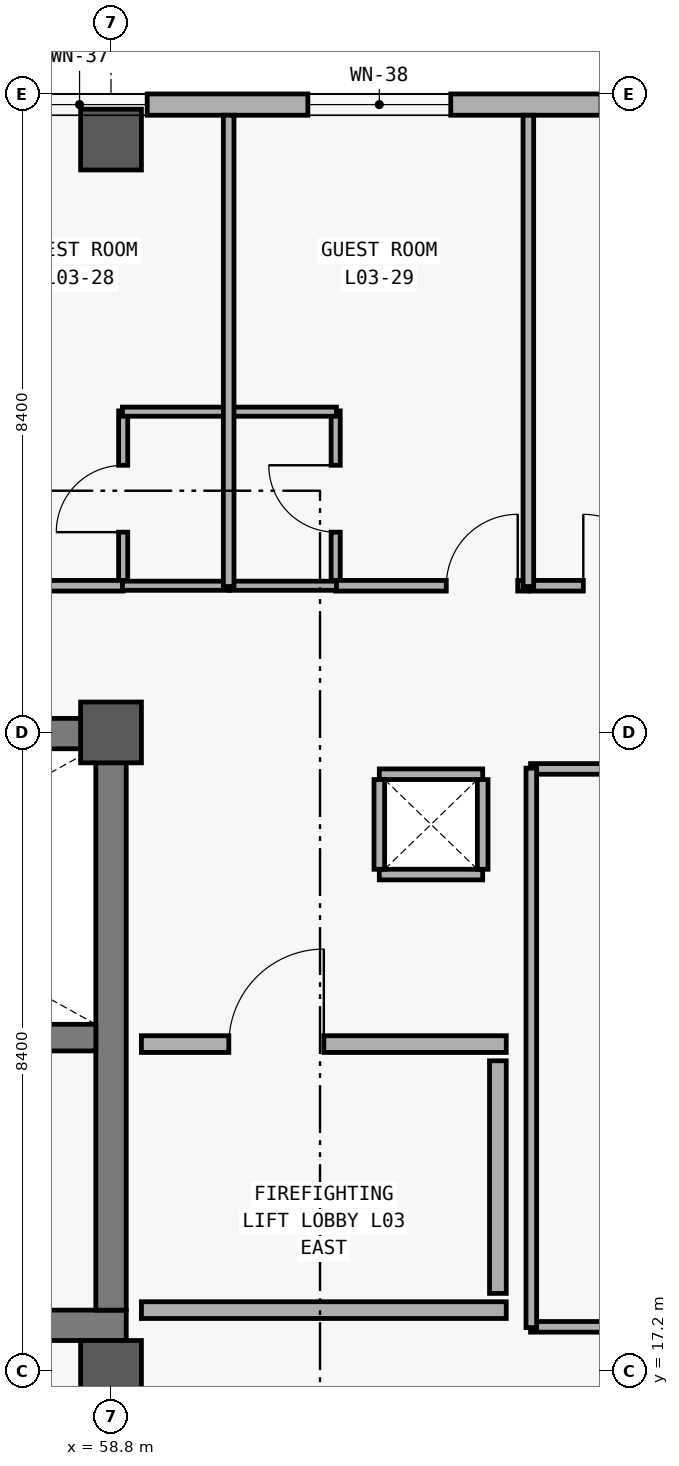
"""IFC4 building model, lengths in metres.
Left out: names, types, materials, properties, quantities, classifications, styles, units other than length and angle.
Written with IfcOpenShell. Run it as: python <this file> out.ifc"""

import sys

from ifc_helpers import new_model, si_unit, direction, frame, frame_2d, origin, origin_2d, place, context, subcontext, project, spatial, rectangle, extrude, element, fill, save


model = new_model("IFC4")
c1 = context("Model", 3, precision=1e-05, world=origin(), true_north=direction((0.0, 1.0)))
c2 = subcontext(c1, "Body", "Model", "MODEL_VIEW")
j1 = project(units=[si_unit("LENGTHUNIT", "METRE"), si_unit("PLANEANGLEUNIT", "RADIAN")], contexts=[c1])
p1 = place(None, origin())
s1 = spatial("IfcSite", under=j1, at=p1, CompositionType="ELEMENT")
p2 = place(p1, origin())
s2 = spatial("IfcBuilding", under=s1, at=p2, CompositionType="ELEMENT")
p3 = place(p2, frame((0.0, 0.0, 15.0)))
s3 = spatial("IfcBuildingStorey", under=s2, at=p3, CompositionType="ELEMENT", Elevation=15.0)
for number, where, z_axis, x_axis in (
    (1, (58.8, 17.2, 0.0), (0.0, 0.0, 1.0), (1.0, 0.0, 0.0)),
    (2, (58.8, 25.6, 0.0), (0.0, 0.0, 1.0), (1.0, 0.0, 0.0)),
    (3, (58.8, 33.4, 0.0), (0.0, 0.0, 1.0), (1.0, 0.0, 0.0)),
):
    element("IfcColumn", number, at=place(p3, frame(where, z_axis=z_axis, x_axis=x_axis)), inside=s3, PredefinedType="COLUMN", context=c2, shape_type="SweptSolid", body=[
        extrude(rectangle(XDim=0.8, YDim=0.8, at=origin_2d()), origin(), (0.0, 0.0, 1.0), 4.2),
    ])
p4 = place(p3, frame((8.68, 33.86, 0.0), z_axis=(0.0, 0.0, 1.0), x_axis=(1.0, 0.0, 0.0)))
e4 = element("IfcWall", 4, at=p4, inside=s3, PredefinedType="SOLIDWALL", context=c2, shape_type="SweptSolid", body=[
    extrude(rectangle(XDim=83.44, YDim=0.28, at=frame_2d((41.72, 0.0))), origin(), (0.0, 0.0, 1.0), 3.92),
])
p5 = place(p4, frame((4.895, 0.0, 0.85)))
e5 = element("IfcOpeningElement", 5, at=p5, cuts=e4, PredefinedType="OPENING", context=c2, shape_type="SweptSolid", body=[
    extrude(rectangle(XDim=2.6, YDim=2.2, at=frame_2d((1.3, 1.1))), frame((0.0, 0.15, 0.0), z_axis=(0.0, -1.0, 0.0), x_axis=(1.0, 0.0, 0.0)), (0.0, 0.0, 1.0), 0.3),
])
p6 = place(p4, frame((13.371, 0.0, 0.85)))
e6 = element("IfcOpeningElement", 6, at=p6, cuts=e4, PredefinedType="OPENING", context=c2, shape_type="SweptSolid", body=[
    extrude(rectangle(XDim=1.7, YDim=2.0, at=frame_2d((0.85, 1.0))), frame((0.0, 0.15, 0.0), z_axis=(0.0, -1.0, 0.0), x_axis=(1.0, 0.0, 0.0)), (0.0, 0.0, 1.0), 0.3),
])
p7 = place(p4, frame((17.015, 0.0, 0.85)))
e7 = element("IfcOpeningElement", 7, at=p7, cuts=e4, PredefinedType="OPENING", context=c2, shape_type="SweptSolid", body=[
    extrude(rectangle(XDim=2.3, YDim=2.05, at=frame_2d((1.15, 1.025))), frame((0.0, 0.15, 0.0), z_axis=(0.0, -1.0, 0.0), x_axis=(1.0, 0.0, 0.0)), (0.0, 0.0, 1.0), 0.3),
])
p8 = place(p4, frame((20.732, 0.0, 0.85)))
e8 = element("IfcOpeningElement", 8, at=p8, cuts=e4, PredefinedType="OPENING", context=c2, shape_type="SweptSolid", body=[
    extrude(rectangle(XDim=2.75, YDim=2.1, at=frame_2d((1.375, 1.05))), frame((0.0, 0.15, 0.0), z_axis=(0.0, -1.0, 0.0), x_axis=(1.0, 0.0, 0.0)), (0.0, 0.0, 1.0), 0.3),
])
p9 = place(p4, frame((25.46, 0.0, 0.85)))
e9 = element("IfcOpeningElement", 9, at=p9, cuts=e4, PredefinedType="OPENING", context=c2, shape_type="SweptSolid", body=[
    extrude(rectangle(XDim=1.18, YDim=1.5, at=frame_2d((0.59, 0.75))), frame((0.0, 0.15, 0.0), z_axis=(0.0, -1.0, 0.0), x_axis=(1.0, 0.0, 0.0)), (0.0, 0.0, 1.0), 0.3),
])
p10 = place(p4, frame((29.352, 0.0, 0.85)))
e10 = element("IfcOpeningElement", 10, at=p10, cuts=e4, PredefinedType="OPENING", context=c2, shape_type="SweptSolid", body=[
    extrude(rectangle(XDim=1.28, YDim=1.6, at=frame_2d((0.64, 0.8))), frame((0.0, 0.15, 0.0), z_axis=(0.0, -1.0, 0.0), x_axis=(1.0, 0.0, 0.0)), (0.0, 0.0, 1.0), 0.3),
])
p11 = place(p4, frame((33.245, 0.0, 0.85)))
e11 = element("IfcOpeningElement", 11, at=p11, cuts=e4, PredefinedType="OPENING", context=c2, shape_type="SweptSolid", body=[
    extrude(rectangle(XDim=1.38, YDim=1.7, at=frame_2d((0.69, 0.85))), frame((0.0, 0.15, 0.0), z_axis=(0.0, -1.0, 0.0), x_axis=(1.0, 0.0, 0.0)), (0.0, 0.0, 1.0), 0.3),
])
p12 = place(p4, frame((37.138, 0.0, 0.85)))
e12 = element("IfcOpeningElement", 12, at=p12, cuts=e4, PredefinedType="OPENING", context=c2, shape_type="SweptSolid", body=[
    extrude(rectangle(XDim=1.48, YDim=1.8, at=frame_2d((0.74, 0.9))), frame((0.0, 0.15, 0.0), z_axis=(0.0, -1.0, 0.0), x_axis=(1.0, 0.0, 0.0)), (0.0, 0.0, 1.0), 0.3),
])
p13 = place(p4, frame((41.031, 0.0, 0.85)))
e13 = element("IfcOpeningElement", 13, at=p13, cuts=e4, PredefinedType="OPENING", context=c2, shape_type="SweptSolid", body=[
    extrude(rectangle(XDim=1.58, YDim=1.85, at=frame_2d((0.79, 0.925))), frame((0.0, 0.15, 0.0), z_axis=(0.0, -1.0, 0.0), x_axis=(1.0, 0.0, 0.0)), (0.0, 0.0, 1.0), 0.3),
])
p14 = place(p4, frame((44.923, 0.0, 0.85)))
e14 = element("IfcOpeningElement", 14, at=p14, cuts=e4, PredefinedType="OPENING", context=c2, shape_type="SweptSolid", body=[
    extrude(rectangle(XDim=1.68, YDim=1.9, at=frame_2d((0.84, 0.95))), frame((0.0, 0.15, 0.0), z_axis=(0.0, -1.0, 0.0), x_axis=(1.0, 0.0, 0.0)), (0.0, 0.0, 1.0), 0.3),
])
p15 = place(p4, frame((48.816, 0.0, 0.85)))
e15 = element("IfcOpeningElement", 15, at=p15, cuts=e4, PredefinedType="OPENING", context=c2, shape_type="SweptSolid", body=[
    extrude(rectangle(XDim=1.78, YDim=1.95, at=frame_2d((0.89, 0.975))), frame((0.0, 0.15, 0.0), z_axis=(0.0, -1.0, 0.0), x_axis=(1.0, 0.0, 0.0)), (0.0, 0.0, 1.0), 0.3),
])
p16 = place(p4, frame((52.71, 0.0, 0.85)))
e16 = element("IfcOpeningElement", 16, at=p16, cuts=e4, PredefinedType="OPENING", context=c2, shape_type="SweptSolid", body=[
    extrude(rectangle(XDim=1.88, YDim=1.95, at=frame_2d((0.94, 0.975))), frame((0.0, 0.15, 0.0), z_axis=(0.0, -1.0, 0.0), x_axis=(1.0, 0.0, 0.0)), (0.0, 0.0, 1.0), 0.3),
])
p17 = place(p4, frame((56.567, 0.0, 0.85)))
e17 = element("IfcOpeningElement", 17, at=p17, cuts=e4, PredefinedType="OPENING", context=c2, shape_type="SweptSolid", body=[
    extrude(rectangle(XDim=2.05, YDim=1.95, at=frame_2d((1.025, 0.975))), frame((0.0, 0.15, 0.0), z_axis=(0.0, -1.0, 0.0), x_axis=(1.0, 0.0, 0.0)), (0.0, 0.0, 1.0), 0.3),
])
p18 = place(p4, frame((60.444, 0.0, 0.85)))
e18 = element("IfcOpeningElement", 18, at=p18, cuts=e4, PredefinedType="OPENING", context=c2, shape_type="SweptSolid", body=[
    extrude(rectangle(XDim=2.18, YDim=1.95, at=frame_2d((1.09, 0.975))), frame((0.0, 0.15, 0.0), z_axis=(0.0, -1.0, 0.0), x_axis=(1.0, 0.0, 0.0)), (0.0, 0.0, 1.0), 0.3),
])
p19 = place(p4, frame((64.287, 0.0, 0.85)))
e19 = element("IfcOpeningElement", 19, at=p19, cuts=e4, PredefinedType="OPENING", context=c2, shape_type="SweptSolid", body=[
    extrude(rectangle(XDim=2.38, YDim=1.95, at=frame_2d((1.19, 0.975))), frame((0.0, 0.15, 0.0), z_axis=(0.0, -1.0, 0.0), x_axis=(1.0, 0.0, 0.0)), (0.0, 0.0, 1.0), 0.3),
])
p20 = place(p4, frame((68.181, 0.0, 0.85)))
e20 = element("IfcOpeningElement", 20, at=p20, cuts=e4, PredefinedType="OPENING", context=c2, shape_type="SweptSolid", body=[
    extrude(rectangle(XDim=2.48, YDim=2.0, at=frame_2d((1.24, 1.0))), frame((0.0, 0.15, 0.0), z_axis=(0.0, -1.0, 0.0), x_axis=(1.0, 0.0, 0.0)), (0.0, 0.0, 1.0), 0.3),
])
p21 = place(p4, frame((72.038, 0.0, 0.85)))
e21 = element("IfcOpeningElement", 21, at=p21, cuts=e4, PredefinedType="OPENING", context=c2, shape_type="SweptSolid", body=[
    extrude(rectangle(XDim=2.65, YDim=2.0, at=frame_2d((1.325, 1.0))), frame((0.0, 0.15, 0.0), z_axis=(0.0, -1.0, 0.0), x_axis=(1.0, 0.0, 0.0)), (0.0, 0.0, 1.0), 0.3),
])
p22 = place(p4, frame((75.831, 0.0, 0.85)))
e22 = element("IfcOpeningElement", 22, at=p22, cuts=e4, PredefinedType="OPENING", context=c2, shape_type="SweptSolid", body=[
    extrude(rectangle(XDim=2.95, YDim=2.05, at=frame_2d((1.475, 1.025))), frame((0.0, 0.15, 0.0), z_axis=(0.0, -1.0, 0.0), x_axis=(1.0, 0.0, 0.0)), (0.0, 0.0, 1.0), 0.3),
])
p23 = place(p4, frame((80.349, 0.0, 0.85)))
e23 = element("IfcOpeningElement", 23, at=p23, cuts=e4, PredefinedType="OPENING", context=c2, shape_type="SweptSolid", body=[
    extrude(rectangle(XDim=1.8, YDim=1.8, at=frame_2d((0.9, 0.9))), frame((0.0, 0.15, 0.0), z_axis=(0.0, -1.0, 0.0), x_axis=(1.0, 0.0, 0.0)), (0.0, 0.0, 1.0), 0.3),
])
p24 = place(p3, frame((49.8, 17.8, 0.0), z_axis=(0.0, 0.0, 1.0), x_axis=(1.0, 0.0, 0.0)))
e24 = element("IfcWall", 24, at=p24, inside=s3, PredefinedType="SHEAR", context=c2, shape_type="SweptSolid", body=[
    extrude(rectangle(XDim=9.2, YDim=0.4, at=frame_2d((4.6, 0.0))), origin(), (0.0, 0.0, 1.0), 3.92),
])
p25 = place(p24, frame((1.1, 0.0, 0.0)))
e25 = element("IfcOpeningElement", 25, at=p25, cuts=e24, PredefinedType="OPENING", context=c2, shape_type="SweptSolid", body=[
    extrude(rectangle(XDim=1.2, YDim=2.2, at=frame_2d((0.6, 1.1))), frame((0.0, 0.21, 0.0), z_axis=(0.0, -1.0, 0.0), x_axis=(1.0, 0.0, 0.0)), (0.0, 0.0, 1.0), 0.42),
])
p26 = place(p24, frame((3.5, 0.0, 0.0)))
e26 = element("IfcOpeningElement", 26, at=p26, cuts=e24, PredefinedType="OPENING", context=c2, shape_type="SweptSolid", body=[
    extrude(rectangle(XDim=1.1, YDim=2.2, at=frame_2d((0.55, 1.1))), frame((0.0, 0.21, 0.0), z_axis=(0.0, -1.0, 0.0), x_axis=(1.0, 0.0, 0.0)), (0.0, 0.0, 1.0), 0.42),
])
p27 = place(p24, frame((5.9, 0.0, 0.0)))
e27 = element("IfcOpeningElement", 27, at=p27, cuts=e24, PredefinedType="OPENING", context=c2, shape_type="SweptSolid", body=[
    extrude(rectangle(XDim=1.3, YDim=2.3, at=frame_2d((0.65, 1.15))), frame((0.0, 0.21, 0.0), z_axis=(0.0, -1.0, 0.0), x_axis=(1.0, 0.0, 0.0)), (0.0, 0.0, 1.0), 0.42),
])
p28 = place(p3, frame((59.0, 25.585, 0.0), z_axis=(0.0, 0.0, 1.0), x_axis=(-1.0, 0.0, 0.0)))
e28 = element("IfcWall", 28, at=p28, inside=s3, PredefinedType="SHEAR", context=c2, shape_type="SweptSolid", body=[
    extrude(rectangle(XDim=9.2, YDim=0.4, at=frame_2d((4.6, 0.0))), origin(), (0.0, 0.0, 1.0), 3.92),
])
p29 = place(p3, frame((58.8, 18.0, 0.0), z_axis=(0.0, 0.0, 1.0), x_axis=(0.0, 1.0, 0.0)))
e29 = element("IfcWall", 29, at=p29, inside=s3, PredefinedType="SHEAR", context=c2, shape_type="SweptSolid", body=[
    extrude(rectangle(XDim=7.4, YDim=0.4, at=frame_2d((3.7, 0.0))), origin(), (0.0, 0.0, 1.0), 3.92),
])
p30 = place(p3, frame((50.2, 21.585, 0.0), z_axis=(0.0, 0.0, 1.0), x_axis=(1.0, 0.0, 0.0)))
e30 = element("IfcWall", 30, at=p30, inside=s3, PredefinedType="SHEAR", context=c2, shape_type="SweptSolid", body=[
    extrude(rectangle(XDim=8.4, YDim=0.35, at=frame_2d((4.2, 0.0))), origin(), (0.0, 0.0, 1.0), 3.92),
])
p31 = place(p3, frame((59.2, 18.0, 0.0), z_axis=(0.0, 0.0, 1.0), x_axis=(1.0, 0.0, 0.0)))
e31 = element("IfcWall", 31, at=p31, inside=s3, PredefinedType="SOLIDWALL", context=c2, shape_type="SweptSolid", body=[
    extrude(rectangle(XDim=4.8, YDim=0.22, at=frame_2d((2.4, 0.0))), origin(), (0.0, 0.0, 1.0), 3.07),
])
p32 = place(p3, frame((59.2, 21.5, 0.0), z_axis=(0.0, 0.0, 1.0), x_axis=(1.0, 0.0, 0.0)))
e32 = element("IfcWall", 32, at=p32, inside=s3, PredefinedType="SOLIDWALL", context=c2, shape_type="SweptSolid", body=[
    extrude(rectangle(XDim=4.8, YDim=0.22, at=frame_2d((2.4, 0.0))), origin(), (0.0, 0.0, 1.0), 3.07),
])
p33 = place(p32, frame((1.15, 0.0, 0.0)))
e33 = element("IfcOpeningElement", 33, at=p33, cuts=e32, PredefinedType="OPENING", context=c2, shape_type="SweptSolid", body=[
    extrude(rectangle(XDim=1.25, YDim=2.2, at=frame_2d((0.625, 1.1))), frame((0.0, 0.12, 0.0), z_axis=(0.0, -1.0, 0.0), x_axis=(1.0, 0.0, 0.0)), (0.0, 0.0, 1.0), 0.24),
])
p34 = place(p3, frame((63.89, 18.22, 0.0), z_axis=(0.0, 0.0, 1.0), x_axis=(0.0, 1.0, 0.0)))
e34 = element("IfcWall", 34, at=p34, inside=s3, PredefinedType="SOLIDWALL", context=c2, shape_type="SweptSolid", body=[
    extrude(rectangle(XDim=3.06, YDim=0.22, at=frame_2d((1.53, 0.0))), origin(), (0.0, 0.0, 1.0), 3.07),
])
p35 = place(p3, frame((58.96, 27.52, 0.0), z_axis=(0.0, 0.0, 1.0), x_axis=(0.0, 1.0, 0.0)))
e35 = element("IfcWall", 35, at=p35, inside=s3, PredefinedType="PARTITIONING", context=c2, shape_type="SweptSolid", body=[
    extrude(rectangle(XDim=2.31, YDim=0.12, at=frame_2d((1.155, 0.0))), origin(), (0.0, 0.0, 1.0), 3.02),
])
p36 = place(p35, frame((0.715, 0.0, 0.0)))
e36 = element("IfcOpeningElement", 36, at=p36, cuts=e35, PredefinedType="OPENING", context=c2, shape_type="SweptSolid", body=[
    extrude(rectangle(XDim=0.88, YDim=2.15, at=frame_2d((0.44, 1.075))), frame((0.0, 0.07, 0.0), z_axis=(0.0, -1.0, 0.0), x_axis=(1.0, 0.0, 0.0)), (0.0, 0.0, 1.0), 0.14),
])
p37 = place(p3, frame((61.756, 27.52, 0.0), z_axis=(0.0, 0.0, 1.0), x_axis=(0.0, 1.0, 0.0)))
e37 = element("IfcWall", 37, at=p37, inside=s3, PredefinedType="PARTITIONING", context=c2, shape_type="SweptSolid", body=[
    extrude(rectangle(XDim=2.31, YDim=0.12, at=frame_2d((1.155, 0.0))), origin(), (0.0, 0.0, 1.0), 3.02),
])
p38 = place(p37, frame((0.715, 0.0, 0.0)))
e38 = element("IfcOpeningElement", 38, at=p38, cuts=e37, PredefinedType="OPENING", context=c2, shape_type="SweptSolid", body=[
    extrude(rectangle(XDim=0.88, YDim=2.15, at=frame_2d((0.44, 1.075))), frame((0.0, 0.07, 0.0), z_axis=(0.0, -1.0, 0.0), x_axis=(1.0, 0.0, 0.0)), (0.0, 0.0, 1.0), 0.14),
])
p39 = place(p3, frame((64.32, 17.78, 0.0), z_axis=(0.0, 0.0, 1.0), x_axis=(1.0, 0.0, 0.0)))
e39 = element("IfcWall", 39, at=p39, inside=s3, PredefinedType="PARTITIONING", context=c2, shape_type="SweptSolid", body=[
    extrude(rectangle(XDim=27.8, YDim=0.14, at=frame_2d((13.9, 0.0))), origin(), (0.0, 0.0, 1.0), 3.02),
])
p40 = place(p39, frame((5.958, 0.0, 0.0)))
e40 = element("IfcOpeningElement", 40, at=p40, cuts=e39, PredefinedType="OPENING", context=c2, shape_type="SweptSolid", body=[
    extrude(rectangle(XDim=1.08, YDim=2.25, at=frame_2d((0.54, 1.125))), frame((0.0, 0.08, 0.0), z_axis=(0.0, -1.0, 0.0), x_axis=(1.0, 0.0, 0.0)), (0.0, 0.0, 1.0), 0.16),
])
p41 = place(p3, frame((56.425, 27.53, 0.0), z_axis=(0.0, 0.0, 1.0), x_axis=(1.0, 0.0, 0.0)))
e41 = element("IfcWall", 41, at=p41, inside=s3, PredefinedType="PARTITIONING", context=c2, shape_type="SweptSolid", body=[
    extrude(rectangle(XDim=2.535, YDim=0.14, at=frame_2d((1.268, 0.0))), origin(), (0.0, 0.0, 1.0), 3.02),
])
p42 = place(p41, frame((0.563, 0.0, 0.0)))
e42 = element("IfcOpeningElement", 42, at=p42, cuts=e41, PredefinedType="OPENING", context=c2, shape_type="SweptSolid", body=[
    extrude(rectangle(XDim=0.94, YDim=2.2, at=frame_2d((0.47, 1.1))), frame((0.0, 0.08, 0.0), z_axis=(0.0, -1.0, 0.0), x_axis=(1.0, 0.0, 0.0)), (0.0, 0.0, 1.0), 0.16),
])
p43 = place(p3, frame((61.756, 27.53, 0.0), z_axis=(0.0, 0.0, 1.0), x_axis=(1.0, 0.0, 0.0)))
e43 = element("IfcWall", 43, at=p43, inside=s3, PredefinedType="PARTITIONING", context=c2, shape_type="SweptSolid", body=[
    extrude(rectangle(XDim=2.535, YDim=0.14, at=frame_2d((1.268, 0.0))), origin(), (0.0, 0.0, 1.0), 3.02),
])
p44 = place(p43, frame((1.455, 0.0, 0.0)))
e44 = element("IfcOpeningElement", 44, at=p44, cuts=e43, PredefinedType="OPENING", context=c2, shape_type="SweptSolid", body=[
    extrude(rectangle(XDim=0.94, YDim=2.2, at=frame_2d((0.47, 1.1))), frame((0.0, 0.08, 0.0), z_axis=(0.0, -1.0, 0.0), x_axis=(1.0, 0.0, 0.0)), (0.0, 0.0, 1.0), 0.16),
])
p45 = place(p3, frame((64.311, 27.53, 0.0), z_axis=(0.0, 0.0, 1.0), x_axis=(1.0, 0.0, 0.0)))
e45 = element("IfcWall", 45, at=p45, inside=s3, PredefinedType="PARTITIONING", context=c2, shape_type="SweptSolid", body=[
    extrude(rectangle(XDim=2.534, YDim=0.14, at=frame_2d((1.267, 0.0))), origin(), (0.0, 0.0, 1.0), 3.02),
])
p46 = place(p45, frame((0.703, 0.0, 0.0)))
e46 = element("IfcOpeningElement", 46, at=p46, cuts=e45, PredefinedType="OPENING", context=c2, shape_type="SweptSolid", body=[
    extrude(rectangle(XDim=0.94, YDim=2.2, at=frame_2d((0.47, 1.1))), frame((0.0, 0.08, 0.0), z_axis=(0.0, -1.0, 0.0), x_axis=(1.0, 0.0, 0.0)), (0.0, 0.0, 1.0), 0.16),
])
for number, where, z_axis, x_axis in (
    (47, (58.95, 27.53, 0.0), (0.0, 0.0, 1.0), (1.0, 0.0, 0.0)),
    (48, (58.95, 29.82, 0.0), (0.0, 0.0, 1.0), (1.0, 0.0, 0.0)),
):
    element("IfcWall", number, at=place(p3, frame(where, z_axis=z_axis, x_axis=x_axis)), inside=s3, PredefinedType="PARTITIONING", context=c2, shape_type="SweptSolid", body=[
        extrude(rectangle(XDim=1.408, YDim=0.12, at=frame_2d((0.704, 0.0))), origin(), (0.0, 0.0, 1.0), 3.02),
    ])
for number, where, z_axis, x_axis in (
    (49, (60.358, 27.53, 0.0), (0.0, 0.0, 1.0), (1.0, 0.0, 0.0)),
    (50, (60.358, 29.82, 0.0), (0.0, 0.0, 1.0), (1.0, 0.0, 0.0)),
):
    element("IfcWall", number, at=place(p3, frame(where, z_axis=z_axis, x_axis=x_axis)), inside=s3, PredefinedType="PARTITIONING", context=c2, shape_type="SweptSolid", body=[
        extrude(rectangle(XDim=1.408, YDim=0.12, at=frame_2d((0.704, 0.0))), origin(), (0.0, 0.0, 1.0), 3.02),
    ])
p47 = place(p3, frame((64.32, 25.12, 0.0), z_axis=(0.0, 0.0, 1.0), x_axis=(1.0, 0.0, 0.0)))
e51 = element("IfcWall", 51, at=p47, inside=s3, PredefinedType="PARTITIONING", context=c2, shape_type="SweptSolid", body=[
    extrude(rectangle(XDim=27.8, YDim=0.14, at=frame_2d((13.9, 0.0))), origin(), (0.0, 0.0, 1.0), 3.02),
])
p48 = place(p3, frame((64.33, 17.77, 0.0), z_axis=(0.0, 0.0, 1.0), x_axis=(0.0, 1.0, 0.0)))
e52 = element("IfcWall", 52, at=p48, inside=s3, PredefinedType="PARTITIONING", context=c2, shape_type="SweptSolid", body=[
    extrude(rectangle(XDim=7.36, YDim=0.14, at=frame_2d((3.68, 0.0))), origin(), (0.0, 0.0, 1.0), 3.02),
])
for number, where, z_axis, x_axis in (
    (53, (60.348, 27.52, 0.0), (0.0, 0.0, 1.0), (0.0, 1.0, 0.0)),
    (54, (64.291, 27.52, 0.0), (0.0, 0.0, 1.0), (0.0, 1.0, 0.0)),
):
    element("IfcWall", number, at=place(p3, frame(where, z_axis=z_axis, x_axis=x_axis)), inside=s3, PredefinedType="PARTITIONING", context=c2, shape_type="SweptSolid", body=[
        extrude(rectangle(XDim=6.2, YDim=0.14, at=frame_2d((3.1, 0.0))), origin(), (0.0, 0.0, 1.0), 3.02),
    ])
for number, where, z_axis, x_axis in (
    (55, (62.33, 23.73, 0.0), (0.0, 0.0, 1.0), (1.0, 0.0, 0.0)),
    (56, (63.69, 25.05, 0.0), (0.0, 0.0, 1.0), (-1.0, 0.0, 0.0)),
):
    element("IfcWall", number, at=place(p3, frame(where, z_axis=z_axis, x_axis=x_axis)), inside=s3, PredefinedType="PARTITIONING", context=c2, shape_type="SweptSolid", body=[
        extrude(rectangle(XDim=1.36, YDim=0.14, at=frame_2d((0.68, 0.0))), origin(), (0.0, 0.0, 1.0), 3.04),
    ])
for number, where, z_axis, x_axis in (
    (57, (62.33, 24.98, 0.0), (0.0, 0.0, 1.0), (0.0, -1.0, 0.0)),
    (58, (63.69, 23.8, 0.0), (0.0, 0.0, 1.0), (0.0, 1.0, 0.0)),
):
    element("IfcWall", number, at=place(p3, frame(where, z_axis=z_axis, x_axis=x_axis)), inside=s3, PredefinedType="PARTITIONING", context=c2, shape_type="SweptSolid", body=[
        extrude(rectangle(XDim=1.18, YDim=0.14, at=frame_2d((0.59, 0.0))), origin(), (0.0, 0.0, 1.0), 3.04),
    ])
p49 = place(p15, origin())
e59 = element("IfcWindow", 59, at=p49, inside=s3, PartitioningType="SINGLE_PANEL", PredefinedType="WINDOW", context=c2, shape_type="SweptSolid", body=[
    extrude(rectangle(XDim=1.78, YDim=1.95, at=frame_2d((0.89, 0.975))), frame((0.0, 0.03, 0.0), z_axis=(0.0, -1.0, 0.0), x_axis=(1.0, 0.0, 0.0)), (0.0, 0.0, 1.0), 0.06),
])
fill(e15, e59)
p50 = place(p16, origin())
e60 = element("IfcWindow", 60, at=p50, inside=s3, PartitioningType="SINGLE_PANEL", PredefinedType="WINDOW", context=c2, shape_type="SweptSolid", body=[
    extrude(rectangle(XDim=1.88, YDim=1.95, at=frame_2d((0.94, 0.975))), frame((0.0, 0.03, 0.0), z_axis=(0.0, -1.0, 0.0), x_axis=(1.0, 0.0, 0.0)), (0.0, 0.0, 1.0), 0.06),
])
fill(e16, e60)
p51 = place(p33, origin())
e61 = element("IfcDoor", 61, at=p51, inside=s3, OperationType="SINGLE_SWING_RIGHT", PredefinedType="DOOR", context=c2, shape_type="SweptSolid", body=[
    extrude(rectangle(XDim=1.25, YDim=2.2, at=frame_2d((0.625, 1.1))), frame((0.0, 0.025, 0.0), z_axis=(0.0, -1.0, 0.0), x_axis=(1.0, 0.0, 0.0)), (0.0, 0.0, 1.0), 0.05),
])
fill(e33, e61)
p52 = place(p36, origin())
e62 = element("IfcDoor", 62, at=p52, inside=s3, OperationType="SINGLE_SWING_LEFT", PredefinedType="DOOR", context=c2, shape_type="SweptSolid", body=[
    extrude(rectangle(XDim=0.88, YDim=2.15, at=frame_2d((0.44, 1.075))), frame((0.0, 0.025, 0.0), z_axis=(0.0, -1.0, 0.0), x_axis=(1.0, 0.0, 0.0)), (0.0, 0.0, 1.0), 0.05),
])
fill(e36, e62)
p53 = place(p38, origin())
e63 = element("IfcDoor", 63, at=p53, inside=s3, OperationType="SINGLE_SWING_RIGHT", PredefinedType="DOOR", context=c2, shape_type="SweptSolid", body=[
    extrude(rectangle(XDim=0.88, YDim=2.15, at=frame_2d((0.44, 1.075))), frame((0.0, 0.025, 0.0), z_axis=(0.0, -1.0, 0.0), x_axis=(1.0, 0.0, 0.0)), (0.0, 0.0, 1.0), 0.05),
])
fill(e38, e63)
p54 = place(p44, origin())
e64 = element("IfcDoor", 64, at=p54, inside=s3, OperationType="SINGLE_SWING_RIGHT", PredefinedType="DOOR", context=c2, shape_type="SweptSolid", body=[
    extrude(rectangle(XDim=0.94, YDim=2.2, at=frame_2d((0.47, 1.1))), frame((0.0, 0.025, 0.0), z_axis=(0.0, -1.0, 0.0), x_axis=(1.0, 0.0, 0.0)), (0.0, 0.0, 1.0), 0.05),
])
fill(e44, e64)
p55 = place(p46, origin())
e65 = element("IfcDoor", 65, at=p55, inside=s3, OperationType="SINGLE_SWING_LEFT", PredefinedType="DOOR", context=c2, shape_type="SweptSolid", body=[
    extrude(rectangle(XDim=0.94, YDim=2.2, at=frame_2d((0.47, 1.1))), frame((0.0, 0.025, 0.0), z_axis=(0.0, -1.0, 0.0), x_axis=(1.0, 0.0, 0.0)), (0.0, 0.0, 1.0), 0.05),
])
fill(e46, e65)
save(model, sys.argv[1])
